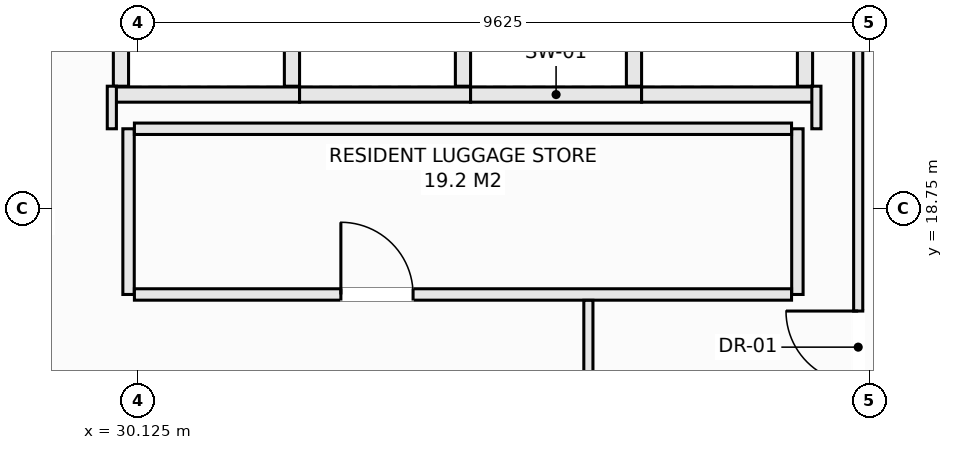
"""IFC4 building model, lengths in metres.
Left out: names, types, materials, properties, quantities, classifications, styles, units other than length and angle.
Written with IfcOpenShell. Run it as: python <this file> out.ifc"""

import sys

from ifc_helpers import new_model, si_unit, direction, frame, frame_2d, origin, place, context, subcontext, project, spatial, rectangle, extrude, element, fill, save


model = new_model("IFC4")
c1 = context("Model", 3, precision=1e-05, world=origin(), true_north=direction((0.0, 1.0)))
c2 = subcontext(c1, "Body", "Model", "MODEL_VIEW")
j1 = project(units=[si_unit("LENGTHUNIT", "METRE"), si_unit("PLANEANGLEUNIT", "RADIAN")], contexts=[c1])
p1 = place(None, origin())
s1 = spatial("IfcSite", under=j1, at=p1, CompositionType="ELEMENT")
p2 = place(p1, origin())
s2 = spatial("IfcBuilding", under=s1, at=p2, CompositionType="ELEMENT")
p3 = place(p2, frame((0.0, 0.0, 242.6)))
s3 = spatial("IfcBuildingStorey", under=s2, at=p3, CompositionType="ELEMENT", Elevation=242.6)
p4 = place(p3, frame((29.8, 20.25, 0.0), z_axis=(0.0, 0.0, 1.0), x_axis=(1.0, 0.0, 0.0)))
e1 = element("IfcWall", 1, at=p4, inside=s3, PredefinedType="SOLIDWALL", context=c2, shape_type="SweptSolid", body=[
    extrude(rectangle(XDim=2.45, YDim=0.2, at=frame_2d((1.225, 0.0))), origin(), (0.0, 0.0, 1.0), 3.03),
])
for number, where, z_axis, x_axis in (
    (2, (29.9, 20.36, 0.0), (0.0, 0.0, 1.0), (0.0, 1.0, 0.0)),
    (3, (32.15, 20.36, 0.0), (0.0, 0.0, 1.0), (0.0, 1.0, 0.0)),
):
    element("IfcWall", number, at=place(p3, frame(where, z_axis=z_axis, x_axis=x_axis)), inside=s3, PredefinedType="SOLIDWALL", context=c2, shape_type="SweptSolid", body=[
        extrude(rectangle(XDim=2.43, YDim=0.2, at=frame_2d((1.215, 0.0))), origin(), (0.0, 0.0, 1.0), 3.03),
    ])
p5 = place(p3, frame((32.25, 20.25, 0.0), z_axis=(0.0, 0.0, 1.0), x_axis=(1.0, 0.0, 0.0)))
e4 = element("IfcWall", 4, at=p5, inside=s3, PredefinedType="SOLIDWALL", context=c2, shape_type="SweptSolid", body=[
    extrude(rectangle(XDim=2.25, YDim=0.2, at=frame_2d((1.125, 0.0))), origin(), (0.0, 0.0, 1.0), 3.03),
])
p6 = place(p3, frame((34.4, 20.36, 0.0), z_axis=(0.0, 0.0, 1.0), x_axis=(0.0, 1.0, 0.0)))
e5 = element("IfcWall", 5, at=p6, inside=s3, PredefinedType="SOLIDWALL", context=c2, shape_type="SweptSolid", body=[
    extrude(rectangle(XDim=2.43, YDim=0.2, at=frame_2d((1.215, 0.0))), origin(), (0.0, 0.0, 1.0), 3.03),
])
p7 = place(p3, frame((34.5, 20.25, 0.0), z_axis=(0.0, 0.0, 1.0), x_axis=(1.0, 0.0, 0.0)))
e6 = element("IfcWall", 6, at=p7, inside=s3, PredefinedType="SOLIDWALL", context=c2, shape_type="SweptSolid", body=[
    extrude(rectangle(XDim=2.25, YDim=0.2, at=frame_2d((1.125, 0.0))), origin(), (0.0, 0.0, 1.0), 3.03),
])
p8 = place(p3, frame((36.65, 20.36, 0.0), z_axis=(0.0, 0.0, 1.0), x_axis=(0.0, 1.0, 0.0)))
e7 = element("IfcWall", 7, at=p8, inside=s3, PredefinedType="SOLIDWALL", context=c2, shape_type="SweptSolid", body=[
    extrude(rectangle(XDim=2.43, YDim=0.2, at=frame_2d((1.215, 0.0))), origin(), (0.0, 0.0, 1.0), 3.03),
])
p9 = place(p3, frame((36.75, 20.25, 0.0), z_axis=(0.0, 0.0, 1.0), x_axis=(1.0, 0.0, 0.0)))
e8 = element("IfcWall", 8, at=p9, inside=s3, PredefinedType="SOLIDWALL", context=c2, shape_type="SweptSolid", body=[
    extrude(rectangle(XDim=2.25, YDim=0.2, at=frame_2d((1.125, 0.0))), origin(), (0.0, 0.0, 1.0), 3.03),
])
p10 = place(p3, frame((38.9, 20.36, 0.0), z_axis=(0.0, 0.0, 1.0), x_axis=(0.0, 1.0, 0.0)))
e9 = element("IfcWall", 9, at=p10, inside=s3, PredefinedType="SOLIDWALL", context=c2, shape_type="SweptSolid", body=[
    extrude(rectangle(XDim=2.43, YDim=0.2, at=frame_2d((1.215, 0.0))), origin(), (0.0, 0.0, 1.0), 3.03),
])
for number, where, z_axis, x_axis in (
    (10, (30.0, 17.62, 0.0), (0.0, 0.0, 1.0), (0.0, 1.0, 0.0)),
    (11, (38.8, 17.62, 0.0), (0.0, 0.0, 1.0), (0.0, 1.0, 0.0)),
):
    element("IfcWall", number, at=place(p3, frame(where, z_axis=z_axis, x_axis=x_axis)), inside=s3, PredefinedType="PARTITIONING", context=c2, shape_type="SweptSolid", body=[
        extrude(rectangle(XDim=2.18, YDim=0.15, at=frame_2d((1.09, 0.0))), origin(), (0.0, 0.0, 1.0), 3.03),
    ])
p11 = place(p3, frame((30.077, 17.62, 0.0), z_axis=(0.0, 0.0, 1.0), x_axis=(1.0, 0.0, 0.0)))
e12 = element("IfcWall", 12, at=p11, inside=s3, PredefinedType="PARTITIONING", context=c2, shape_type="SweptSolid", body=[
    extrude(rectangle(XDim=8.646, YDim=0.15, at=frame_2d((4.323, 0.0))), origin(), (0.0, 0.0, 1.0), 3.03),
])
p12 = place(p11, frame((2.717, 0.0, 0.0)))
e13 = element("IfcOpeningElement", 13, at=p12, cuts=e12, PredefinedType="OPENING", context=c2, shape_type="SweptSolid", body=[
    extrude(rectangle(XDim=0.95, YDim=2.1, at=frame_2d((0.475, 1.05))), frame((0.0, 0.085, 0.0), z_axis=(0.0, -1.0, 0.0), x_axis=(1.0, 0.0, 0.0)), (0.0, 0.0, 1.0), 0.17),
])
p13 = place(p3, frame((30.077, 19.8, 0.0), z_axis=(0.0, 0.0, 1.0), x_axis=(1.0, 0.0, 0.0)))
e14 = element("IfcWall", 14, at=p13, inside=s3, PredefinedType="PARTITIONING", context=c2, shape_type="SweptSolid", body=[
    extrude(rectangle(XDim=8.646, YDim=0.15, at=frame_2d((4.323, 0.0))), origin(), (0.0, 0.0, 1.0), 3.03),
])
p14 = place(p3, frame((39.05, 19.8, 0.0), z_axis=(0.0, 0.0, 1.0), x_axis=(0.0, 1.0, 0.0)))
e15 = element("IfcWall", 15, at=p14, inside=s3, PredefinedType="PARTITIONING", context=c2, shape_type="SweptSolid", body=[
    extrude(rectangle(XDim=0.56, YDim=0.12, at=frame_2d((0.28, 0.0))), origin(), (0.0, 0.0, 1.0), 3.03),
])
p15 = place(p3, frame((39.6, 14.952, 0.0), z_axis=(0.0, 0.0, 1.0), x_axis=(0.0, 1.0, 0.0)))
e16 = element("IfcWall", 16, at=p15, inside=s3, PredefinedType="PARTITIONING", context=c2, shape_type="SweptSolid", body=[
    extrude(rectangle(XDim=8.068, YDim=0.12, at=frame_2d((4.034, 0.0))), origin(), (0.0, 0.0, 1.0), 2.478),
])
p16 = place(p15, frame((1.5, 0.0, 0.0)))
e17 = element("IfcOpeningElement", 17, at=p16, cuts=e16, PredefinedType="OPENING", context=c2, shape_type="SweptSolid", body=[
    extrude(rectangle(XDim=0.95, YDim=2.1, at=frame_2d((0.475, 1.05))), frame((0.0, 0.07, 0.0), z_axis=(0.0, -1.0, 0.0), x_axis=(1.0, 0.0, 0.0)), (0.0, 0.0, 1.0), 0.14),
])
p17 = place(p3, frame((39.662, 15.031, 0.0), z_axis=(0.0, 0.0, 1.0), x_axis=(0.616497420092, 0.787356927334, 0.0)))
e18 = element("IfcWall", 18, at=p17, inside=s3, PredefinedType="PARTITIONING", context=c2, shape_type="SweptSolid", body=[
    extrude(rectangle(XDim=2.958, YDim=0.12, at=frame_2d((1.479, 0.0))), origin(), (0.0, 0.0, 1.0), 3.03),
])
p18 = place(p3, frame((29.78, 19.8, 0.0), z_axis=(0.0, 0.0, 1.0), x_axis=(0.0, 1.0, 0.0)))
e19 = element("IfcWall", 19, at=p18, inside=s3, PredefinedType="PARTITIONING", context=c2, shape_type="SweptSolid", body=[
    extrude(rectangle(XDim=0.56, YDim=0.12, at=frame_2d((0.28, 0.0))), origin(), (0.0, 0.0, 1.0), 3.03),
])
p19 = place(p3, frame((36.05, 14.95, 0.0), z_axis=(0.0, 0.0, 1.0), x_axis=(0.0, 1.0, 0.0)))
e20 = element("IfcWall", 20, at=p19, inside=s3, PredefinedType="PARTITIONING", context=c2, shape_type="SweptSolid", body=[
    extrude(rectangle(XDim=2.593, YDim=0.12, at=frame_2d((1.296, 0.0))), origin(), (0.0, 0.0, 1.0), 3.03),
])
p20 = place(p12, origin())
e21 = element("IfcDoor", 21, at=p20, inside=s3, OperationType="SINGLE_SWING_LEFT", PredefinedType="DOOR", context=c2, shape_type="SweptSolid", body=[
    extrude(rectangle(XDim=0.95, YDim=2.1, at=frame_2d((0.475, 1.05))), frame((0.0, 0.025, 0.0), z_axis=(0.0, -1.0, 0.0), x_axis=(1.0, 0.0, 0.0)), (0.0, 0.0, 1.0), 0.05),
])
fill(e13, e21)
p21 = place(p16, origin())
e22 = element("IfcDoor", 22, at=p21, inside=s3, OperationType="SINGLE_SWING_RIGHT", PredefinedType="DOOR", context=c2, shape_type="SweptSolid", body=[
    extrude(rectangle(XDim=0.95, YDim=2.1, at=frame_2d((0.475, 1.05))), frame((0.0, 0.025, 0.0), z_axis=(0.0, -1.0, 0.0), x_axis=(1.0, 0.0, 0.0)), (0.0, 0.0, 1.0), 0.05),
])
fill(e17, e22)
save(model, sys.argv[1])
